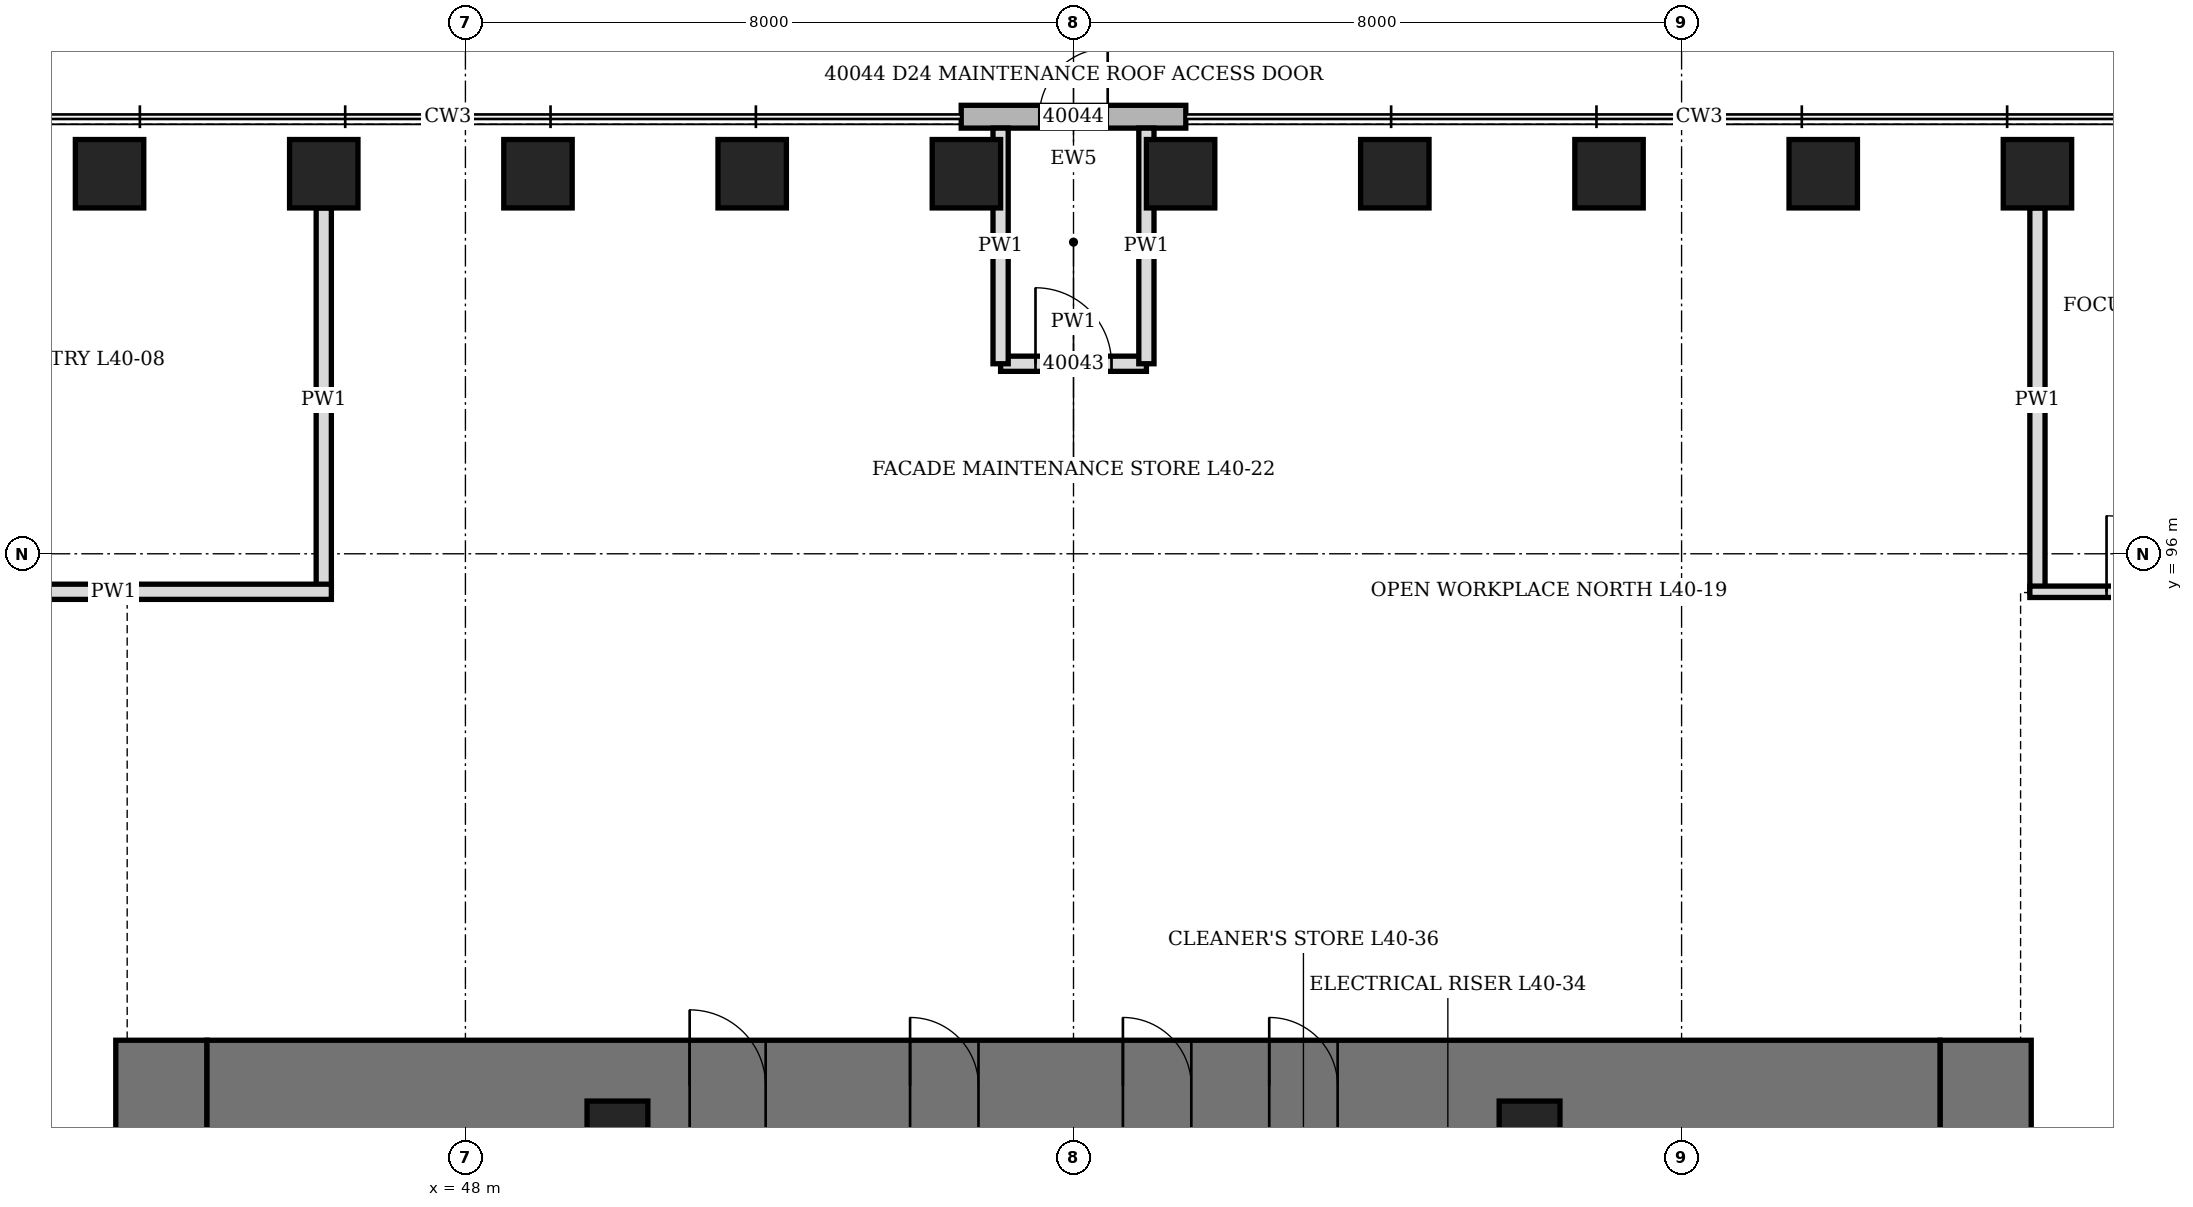
"""IFC4 building model, lengths in metres.
Left out: names, types, materials, properties, quantities, classifications, styles, units other than length and angle.
Written with IfcOpenShell. Run it as: python <this file> out.ifc"""

import sys

from ifc_helpers import new_model, si_unit, direction, frame, frame_2d, origin, origin_2d, place, context, subcontext, project, spatial, rectangle, hollow_rectangle, extrude, element, fill, save


model = new_model("IFC4")
c1 = context("Model", 3, precision=1e-05, world=origin(), true_north=direction((0.0, 1.0)))
c2 = subcontext(c1, "Body", "Model", "MODEL_VIEW")
j1 = project(units=[si_unit("LENGTHUNIT", "METRE"), si_unit("PLANEANGLEUNIT", "RADIAN")], contexts=[c1])
p1 = place(None, origin())
s1 = spatial("IfcSite", under=j1, at=p1, CompositionType="ELEMENT")
p2 = place(p1, origin())
s2 = spatial("IfcBuilding", under=s1, at=p2, CompositionType="ELEMENT")
p3 = place(p2, frame((0.0, 0.0, 181.3)))
s3 = spatial("IfcBuildingStorey", under=s2, at=p3, CompositionType="ELEMENT", Elevation=181.3)
for number, where, z_axis, x_axis in (
    (1, (68.682, 101.0, -0.25), (0.0, 0.0, 1.0), (1.0, 0.0, 0.0)),
    (2, (65.864, 101.0, -0.25), (0.0, 0.0, 1.0), (1.0, 0.0, 0.0)),
    (3, (63.045, 101.0, -0.25), (0.0, 0.0, 1.0), (1.0, 0.0, 0.0)),
    (4, (60.227, 101.0, -0.25), (0.0, 0.0, 1.0), (1.0, 0.0, 0.0)),
    (5, (57.409, 101.0, -0.25), (0.0, 0.0, 1.0), (1.0, 0.0, 0.0)),
    (6, (54.591, 101.0, -0.25), (0.0, 0.0, 1.0), (1.0, 0.0, 0.0)),
    (7, (51.773, 101.0, -0.25), (0.0, 0.0, 1.0), (1.0, 0.0, 0.0)),
    (8, (48.955, 101.0, -0.25), (0.0, 0.0, 1.0), (1.0, 0.0, 0.0)),
    (9, (46.136, 101.0, -0.25), (0.0, 0.0, 1.0), (1.0, 0.0, 0.0)),
    (10, (43.318, 101.0, -0.25), (0.0, 0.0, 1.0), (1.0, 0.0, 0.0)),
):
    element("IfcColumn", number, at=place(p3, frame(where, z_axis=z_axis, x_axis=x_axis)), inside=s3, PredefinedType="COLUMN", context=c2, shape_type="SweptSolid", body=[
        extrude(hollow_rectangle(XDim=0.9, YDim=0.9, WallThickness=0.15, at=origin_2d()), origin(), (0.0, 0.0, 1.0), 4.45),
    ])
p4 = place(p3, frame((44.0, 70.4, 0.0), z_axis=(0.0, 0.0, 1.0), x_axis=(0.0, 1.0, 0.0)))
e11 = element("IfcWall", 11, at=p4, inside=s3, PredefinedType="SHEAR", context=c2, shape_type="SweptSolid", body=[
    extrude(rectangle(XDim=19.2, YDim=1.2, at=frame_2d((9.6, 0.0))), origin(), (0.0, 0.0, 1.0), 4.2),
])
p5 = place(p4, frame((8.6, 0.0, 0.0)))
e12 = element("IfcOpeningElement", 12, at=p5, cuts=e11, PredefinedType="OPENING", context=c2, shape_type="SweptSolid", body=[
    extrude(rectangle(XDim=2.0, YDim=2.4, at=frame_2d((1.0, 1.2))), frame((0.0, 0.61, 0.0), z_axis=(0.0, -1.0, 0.0), x_axis=(1.0, 0.0, 0.0)), (0.0, 0.0, 1.0), 1.22),
])
p6 = place(p3, frame((68.0, 70.4, 0.0), z_axis=(0.0, 0.0, 1.0), x_axis=(0.0, 1.0, 0.0)))
e13 = element("IfcWall", 13, at=p6, inside=s3, PredefinedType="SHEAR", context=c2, shape_type="SweptSolid", body=[
    extrude(rectangle(XDim=19.2, YDim=1.2, at=frame_2d((9.6, 0.0))), origin(), (0.0, 0.0, 1.0), 4.2),
])
p7 = place(p6, frame((8.6, 0.0, 0.0)))
e14 = element("IfcOpeningElement", 14, at=p7, cuts=e13, PredefinedType="OPENING", context=c2, shape_type="SweptSolid", body=[
    extrude(rectangle(XDim=2.0, YDim=2.4, at=frame_2d((1.0, 1.2))), frame((0.0, 0.61, 0.0), z_axis=(0.0, -1.0, 0.0), x_axis=(1.0, 0.0, 0.0)), (0.0, 0.0, 1.0), 1.22),
])
p8 = place(p3, frame((44.6, 89.0, 0.0), z_axis=(0.0, 0.0, 1.0), x_axis=(1.0, 0.0, 0.0)))
e15 = element("IfcWall", 15, at=p8, inside=s3, PredefinedType="SHEAR", context=c2, shape_type="SweptSolid", body=[
    extrude(rectangle(XDim=22.8, YDim=1.2, at=frame_2d((11.4, 0.0))), origin(), (0.0, 0.0, 1.0), 4.2),
])
p9 = place(p8, frame((6.35, 0.0, 0.0)))
e16 = element("IfcOpeningElement", 16, at=p9, cuts=e15, PredefinedType="OPENING", context=c2, shape_type="SweptSolid", body=[
    extrude(rectangle(XDim=1.0, YDim=2.1, at=frame_2d((0.5, 1.05))), frame((0.0, 0.61, 0.0), z_axis=(0.0, -1.0, 0.0), x_axis=(1.0, 0.0, 0.0)), (0.0, 0.0, 1.0), 1.22),
])
p10 = place(p8, frame((9.25, 0.0, 0.0)))
e17 = element("IfcOpeningElement", 17, at=p10, cuts=e15, PredefinedType="OPENING", context=c2, shape_type="SweptSolid", body=[
    extrude(rectangle(XDim=0.9, YDim=2.1, at=frame_2d((0.45, 1.05))), frame((0.0, 0.61, 0.0), z_axis=(0.0, -1.0, 0.0), x_axis=(1.0, 0.0, 0.0)), (0.0, 0.0, 1.0), 1.22),
])
p11 = place(p8, frame((12.05, 0.0, 0.0)))
e18 = element("IfcOpeningElement", 18, at=p11, cuts=e15, PredefinedType="OPENING", context=c2, shape_type="SweptSolid", body=[
    extrude(rectangle(XDim=0.9, YDim=2.1, at=frame_2d((0.45, 1.05))), frame((0.0, 0.61, 0.0), z_axis=(0.0, -1.0, 0.0), x_axis=(1.0, 0.0, 0.0)), (0.0, 0.0, 1.0), 1.22),
])
p12 = place(p8, frame((13.975, 0.0, 0.0)))
e19 = element("IfcOpeningElement", 19, at=p12, cuts=e15, PredefinedType="OPENING", context=c2, shape_type="SweptSolid", body=[
    extrude(rectangle(XDim=0.9, YDim=2.1, at=frame_2d((0.45, 1.05))), frame((0.0, 0.61, 0.0), z_axis=(0.0, -1.0, 0.0), x_axis=(1.0, 0.0, 0.0)), (0.0, 0.0, 1.0), 1.22),
])
for number, where, z_axis, x_axis in (
    (20, (50.0, 88.4, 0.0), (0.0, 0.0, 1.0), (1.0, 0.0, 0.0)),
    (21, (62.0, 88.4, 0.0), (0.0, 0.0, 1.0), (1.0, 0.0, 0.0)),
):
    element("IfcColumn", number, at=place(p3, frame(where, z_axis=z_axis, x_axis=x_axis)), inside=s3, PredefinedType="COLUMN", context=c2, shape_type="SweptSolid", body=[
        extrude(hollow_rectangle(XDim=0.8, YDim=0.8, WallThickness=0.1, at=origin_2d()), origin(), (0.0, 0.0, 1.0), 4.2),
    ])
p13 = place(p3, frame((57.477, 101.75, 0.0), z_axis=(0.0, 0.0, 1.0), x_axis=(-1.0, 0.0, 0.0)))
e22 = element("IfcWall", 22, at=p13, inside=s3, PredefinedType="SOLIDWALL", context=c2, shape_type="SweptSolid", body=[
    extrude(rectangle(XDim=2.955, YDim=0.3, at=frame_2d((1.477, 0.0))), origin(), (0.0, 0.0, 1.0), 4.04),
])
p14 = place(p13, frame((1.027, 0.0, 0.0)))
e23 = element("IfcOpeningElement", 23, at=p14, cuts=e22, PredefinedType="OPENING", context=c2, shape_type="SweptSolid", body=[
    extrude(rectangle(XDim=0.9, YDim=2.1, at=frame_2d((0.45, 1.05))), frame((0.0, 0.16, 0.0), z_axis=(0.0, -1.0, 0.0), x_axis=(1.0, 0.0, 0.0)), (0.0, 0.0, 1.0), 0.32),
])
for number, where, z_axis, x_axis in (
    (24, (46.136, 95.5, 0.0), (0.0, 0.0, 1.0), (0.0, 1.0, 0.0)),
    (25, (68.682, 95.5, 0.0), (0.0, 0.0, 1.0), (0.0, 1.0, 0.0)),
):
    element("IfcWall", number, at=place(p3, frame(where, z_axis=z_axis, x_axis=x_axis)), inside=s3, PredefinedType="PARTITIONING", context=c2, shape_type="SweptSolid", body=[
        extrude(rectangle(XDim=5.05, YDim=0.2, at=frame_2d((2.525, 0.0))), origin(), (0.0, 0.0, 1.0), 3.428),
    ])
p15 = place(p3, frame((68.582, 95.5, 0.0), z_axis=(0.0, 0.0, 1.0), x_axis=(1.0, 0.0, 0.0)))
e26 = element("IfcWall", 26, at=p15, inside=s3, PredefinedType="PARTITIONING", context=c2, shape_type="SweptSolid", body=[
    extrude(rectangle(XDim=2.918, YDim=0.15, at=frame_2d((1.459, 0.0))), origin(), (0.0, 0.0, 1.0), 4.04),
])
p16 = place(p15, frame((1.009, 0.0, 0.0)))
e27 = element("IfcOpeningElement", 27, at=p16, cuts=e26, PredefinedType="OPENING", context=c2, shape_type="SweptSolid", body=[
    extrude(rectangle(XDim=1.0, YDim=2.4, at=frame_2d((0.5, 1.2))), frame((0.0, 0.085, 0.0), z_axis=(0.0, -1.0, 0.0), x_axis=(1.0, 0.0, 0.0)), (0.0, 0.0, 1.0), 0.17),
])
p17 = place(p3, frame((40.5, 95.5, 0.0), z_axis=(0.0, 0.0, 1.0), x_axis=(1.0, 0.0, 0.0)))
e28 = element("IfcWall", 28, at=p17, inside=s3, PredefinedType="PARTITIONING", context=c2, shape_type="SweptSolid", body=[
    extrude(rectangle(XDim=5.736, YDim=0.2, at=frame_2d((2.868, 0.0))), origin(), (0.0, 0.0, 1.0), 4.04),
])
p18 = place(p17, frame((0.909, 0.0, 0.0)))
e29 = element("IfcOpeningElement", 29, at=p18, cuts=e28, PredefinedType="OPENING", context=c2, shape_type="SweptSolid", body=[
    extrude(rectangle(XDim=1.0, YDim=2.1, at=frame_2d((0.5, 1.05))), frame((0.0, 0.11, 0.0), z_axis=(0.0, -1.0, 0.0), x_axis=(1.0, 0.0, 0.0)), (0.0, 0.0, 1.0), 0.22),
])
p19 = place(p3, frame((55.041, 98.5, 0.0), z_axis=(0.0, 0.0, 1.0), x_axis=(1.0, 0.0, 0.0)))
e30 = element("IfcWall", 30, at=p19, inside=s3, PredefinedType="PARTITIONING", context=c2, shape_type="SweptSolid", body=[
    extrude(rectangle(XDim=1.918, YDim=0.2, at=frame_2d((0.959, 0.0))), origin(), (0.0, 0.0, 1.0), 4.04),
])
p20 = place(p19, frame((0.459, 0.0, 0.0)))
e31 = element("IfcOpeningElement", 31, at=p20, cuts=e30, PredefinedType="OPENING", context=c2, shape_type="SweptSolid", body=[
    extrude(rectangle(XDim=1.0, YDim=2.1, at=frame_2d((0.5, 1.05))), frame((0.0, 0.11, 0.0), z_axis=(0.0, -1.0, 0.0), x_axis=(1.0, 0.0, 0.0)), (0.0, 0.0, 1.0), 0.22),
])
for number, where, z_axis, x_axis in (
    (32, (55.041, 101.6, 0.0), (0.0, 0.0, 1.0), (0.0, -1.0, 0.0)),
    (33, (56.959, 101.6, 0.0), (0.0, 0.0, 1.0), (0.0, -1.0, 0.0)),
):
    element("IfcWall", number, at=place(p3, frame(where, z_axis=z_axis, x_axis=x_axis)), inside=s3, PredefinedType="PARTITIONING", context=c2, shape_type="SweptSolid", body=[
        extrude(rectangle(XDim=3.1, YDim=0.2, at=frame_2d((1.55, 0.0))), origin(), (0.0, 0.0, 1.0), 4.04),
    ])
p21 = place(p9, origin())
e34 = element("IfcDoor", 34, at=p21, inside=s3, OperationType="SINGLE_SWING_LEFT", PredefinedType="DOOR", context=c2, shape_type="SweptSolid", body=[
    extrude(rectangle(XDim=1.0, YDim=2.1, at=frame_2d((0.5, 1.05))), frame((0.0, 0.35, 0.0), z_axis=(0.0, -1.0, 0.0), x_axis=(1.0, 0.0, 0.0)), (0.0, 0.0, 1.0), 0.7),
])
fill(e16, e34)
p22 = place(p10, origin())
e35 = element("IfcDoor", 35, at=p22, inside=s3, OperationType="SINGLE_SWING_LEFT", PredefinedType="DOOR", context=c2, shape_type="SweptSolid", body=[
    extrude(rectangle(XDim=0.9, YDim=2.1, at=frame_2d((0.45, 1.05))), frame((0.0, 0.35, 0.0), z_axis=(0.0, -1.0, 0.0), x_axis=(1.0, 0.0, 0.0)), (0.0, 0.0, 1.0), 0.7),
])
fill(e17, e35)
p23 = place(p11, origin())
e36 = element("IfcDoor", 36, at=p23, inside=s3, OperationType="SINGLE_SWING_LEFT", PredefinedType="DOOR", context=c2, shape_type="SweptSolid", body=[
    extrude(rectangle(XDim=0.9, YDim=2.1, at=frame_2d((0.45, 1.05))), frame((0.0, 0.35, 0.0), z_axis=(0.0, -1.0, 0.0), x_axis=(1.0, 0.0, 0.0)), (0.0, 0.0, 1.0), 0.7),
])
fill(e18, e36)
p24 = place(p12, origin())
e37 = element("IfcDoor", 37, at=p24, inside=s3, OperationType="SINGLE_SWING_LEFT", PredefinedType="DOOR", context=c2, shape_type="SweptSolid", body=[
    extrude(rectangle(XDim=0.9, YDim=2.1, at=frame_2d((0.45, 1.05))), frame((0.0, 0.35, 0.0), z_axis=(0.0, -1.0, 0.0), x_axis=(1.0, 0.0, 0.0)), (0.0, 0.0, 1.0), 0.7),
])
fill(e19, e37)
p25 = place(p16, origin())
e38 = element("IfcDoor", 38, at=p25, inside=s3, OperationType="SINGLE_SWING_RIGHT", PredefinedType="DOOR", context=c2, shape_type="SweptSolid", body=[
    extrude(rectangle(XDim=1.0, YDim=2.4, at=frame_2d((0.5, 1.2))), frame((0.0, 0.075, 0.0), z_axis=(0.0, -1.0, 0.0), x_axis=(1.0, 0.0, 0.0)), (0.0, 0.0, 1.0), 0.149),
])
fill(e27, e38)
p26 = place(p20, origin())
e39 = element("IfcDoor", 39, at=p26, inside=s3, OperationType="SINGLE_SWING_LEFT", PredefinedType="DOOR", context=c2, shape_type="SweptSolid", body=[
    extrude(rectangle(XDim=1.0, YDim=2.1, at=frame_2d((0.5, 1.05))), frame((0.0, 0.1, 0.0), z_axis=(0.0, -1.0, 0.0), x_axis=(1.0, 0.0, 0.0)), (0.0, 0.0, 1.0), 0.199),
])
fill(e31, e39)
p27 = place(p14, frame((0.9, 0.0, 0.0), z_axis=(0.0, 0.0, 1.0), x_axis=(-1.0, 0.0, 0.0)))
e40 = element("IfcDoor", 40, at=p27, inside=s3, OperationType="SINGLE_SWING_RIGHT", PredefinedType="DOOR", context=c2, shape_type="SweptSolid", body=[
    extrude(rectangle(XDim=0.9, YDim=2.1, at=frame_2d((0.45, 1.05))), frame((0.0, 0.15, 0.0), z_axis=(0.0, -1.0, 0.0), x_axis=(1.0, 0.0, 0.0)), (0.0, 0.0, 1.0), 0.3),
])
fill(e23, e40)
save(model, sys.argv[1])
